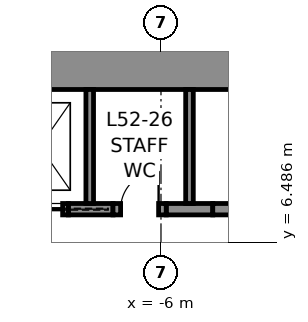
"""IFC4 building model, lengths in metres.
Left out: names, types, materials, properties, quantities, classifications, styles, units other than length and angle.
Written with IfcOpenShell. Run it as: python <this file> out.ifc"""

import sys

from ifc_helpers import new_model, si_unit, direction, frame, frame_2d, origin, place, context, subcontext, project, spatial, rectangle, extrude, element, fill, save


model = new_model("IFC4")
c1 = context("Model", 3, precision=1e-05, world=origin(), true_north=direction((0.0, 1.0)))
c2 = subcontext(c1, "Body", "Model", "MODEL_VIEW")
j1 = project(units=[si_unit("LENGTHUNIT", "METRE"), si_unit("PLANEANGLEUNIT", "RADIAN")], contexts=[c1])
p1 = place(None, origin())
s1 = spatial("IfcSite", under=j1, at=p1, CompositionType="ELEMENT")
p2 = place(p1, origin())
s2 = spatial("IfcBuilding", under=s1, at=p2, CompositionType="ELEMENT")
p3 = place(p2, frame((0.0, 0.0, 237.8)))
s3 = spatial("IfcBuildingStorey", under=s2, at=p3, CompositionType="ELEMENT", Elevation=237.8)
p4 = place(p3, frame((-12.0, 11.25, 0.0), z_axis=(0.0, 0.0, 1.0), x_axis=(1.0, 0.0, 0.0)))
e1 = element("IfcWall", 1, at=p4, inside=s3, PredefinedType="SHEAR", context=c2, shape_type="SweptSolid", body=[
    extrude(rectangle(XDim=24.0, YDim=1.5, at=frame_2d((12.0, 0.0))), origin(), (0.0, 0.0, 1.0), 4.0),
])
p5 = place(p3, frame((-8.438, 7.35, 0.0), z_axis=(0.0, 0.0, 1.0), x_axis=(1.0, 0.0, 0.0)))
e2 = element("IfcWall", 2, at=p5, inside=s3, PredefinedType="SHEAR", context=c2, shape_type="SweptSolid", body=[
    extrude(rectangle(XDim=1.175, YDim=0.3, at=frame_2d((0.587, 0.0))), origin(), (0.0, 0.0, 1.0), 4.0),
])
p6 = place(p3, frame((-5.863, 7.35, 0.0), z_axis=(0.0, 0.0, 1.0), x_axis=(1.0, 0.0, 0.0)))
e3 = element("IfcWall", 3, at=p6, inside=s3, PredefinedType="SHEAR", context=c2, shape_type="SweptSolid", body=[
    extrude(rectangle(XDim=1.225, YDim=0.3, at=frame_2d((0.613, 0.0))), origin(), (0.0, 0.0, 1.0), 4.0),
])
p7 = place(p3, frame((-9.938, 7.35, 0.0), z_axis=(0.0, 0.0, 1.0), x_axis=(1.0, 0.0, 0.0)))
e4 = element("IfcWall", 4, at=p7, inside=s3, PredefinedType="PARTITIONING", context=c2, shape_type="SweptSolid", body=[
    extrude(rectangle(XDim=1.5, YDim=0.3, at=frame_2d((0.75, 0.0))), origin(), (0.0, 0.0, 1.0), 4.0),
])
p8 = place(p7, frame((0.15, 0.0, 0.0)))
e5 = element("IfcOpeningElement", 5, at=p8, cuts=e4, PredefinedType="OPENING", context=c2, shape_type="SweptSolid", body=[
    extrude(rectangle(XDim=1.2, YDim=2.3, at=frame_2d((0.6, 1.15))), frame((0.0, 0.16, 0.0), z_axis=(0.0, -1.0, 0.0), x_axis=(1.0, 0.0, 0.0)), (0.0, 0.0, 1.0), 0.32),
])
p9 = place(p3, frame((-7.262, 7.35, 0.0), z_axis=(0.0, 0.0, 1.0), x_axis=(1.0, 0.0, 0.0)))
e6 = element("IfcWall", 6, at=p9, inside=s3, PredefinedType="PARTITIONING", context=c2, shape_type="SweptSolid", body=[
    extrude(rectangle(XDim=1.4, YDim=0.3, at=frame_2d((0.7, 0.0))), origin(), (0.0, 0.0, 1.0), 4.0),
])
p10 = place(p9, frame((0.2, 0.0, 0.0)))
e7 = element("IfcOpeningElement", 7, at=p10, cuts=e6, PredefinedType="OPENING", context=c2, shape_type="SweptSolid", body=[
    extrude(rectangle(XDim=1.0, YDim=2.3, at=frame_2d((0.5, 1.15))), frame((0.0, 0.16, 0.0), z_axis=(0.0, -1.0, 0.0), x_axis=(1.0, 0.0, 0.0)), (0.0, 0.0, 1.0), 0.32),
])
p11 = place(p3, frame((-4.637, 7.35, 0.0), z_axis=(0.0, 0.0, 1.0), x_axis=(1.0, 0.0, 0.0)))
e8 = element("IfcWall", 8, at=p11, inside=s3, PredefinedType="PARTITIONING", context=c2, shape_type="SweptSolid", body=[
    extrude(rectangle(XDim=1.4, YDim=0.3, at=frame_2d((0.7, 0.0))), origin(), (0.0, 0.0, 1.0), 4.0),
])
for number, where, z_axis, x_axis in (
    (9, (-7.875, 7.5, 0.0), (0.0, 0.0, 1.0), (0.0, 1.0, 0.0)),
    (10, (-5.25, 7.5, 0.0), (0.0, 0.0, 1.0), (0.0, 1.0, 0.0)),
):
    element("IfcWall", number, at=place(p3, frame(where, z_axis=z_axis, x_axis=x_axis)), inside=s3, PredefinedType="PARTITIONING", context=c2, shape_type="SweptSolid", body=[
        extrude(rectangle(XDim=3.0, YDim=0.2, at=frame_2d((1.5, 0.0))), origin(), (0.0, 0.0, 1.0), 4.0),
    ])
p12 = place(p10, origin())
e11 = element("IfcDoor", 11, at=p12, inside=s3, OperationType="SINGLE_SWING_RIGHT", PredefinedType="DOOR", context=c2, shape_type="SweptSolid", body=[
    extrude(rectangle(XDim=1.0, YDim=2.3, at=frame_2d((0.5, 1.15))), frame((0.0, 0.025, 0.0), z_axis=(0.0, -1.0, 0.0), x_axis=(1.0, 0.0, 0.0)), (0.0, 0.0, 1.0), 0.05),
])
fill(e7, e11)
p13 = place(p8, frame((1.2, 0.0, 0.0), z_axis=(0.0, 0.0, 1.0), x_axis=(-1.0, 0.0, 0.0)))
e12 = element("IfcDoor", 12, at=p13, inside=s3, OperationType="SLIDING_TO_LEFT", PredefinedType="DOOR", context=c2, shape_type="SweptSolid", body=[
    extrude(rectangle(XDim=1.2, YDim=2.3, at=frame_2d((0.6, 1.15))), frame((0.0, 0.025, 0.0), z_axis=(0.0, -1.0, 0.0), x_axis=(1.0, 0.0, 0.0)), (0.0, 0.0, 1.0), 0.05),
])
fill(e5, e12)
save(model, sys.argv[1])
